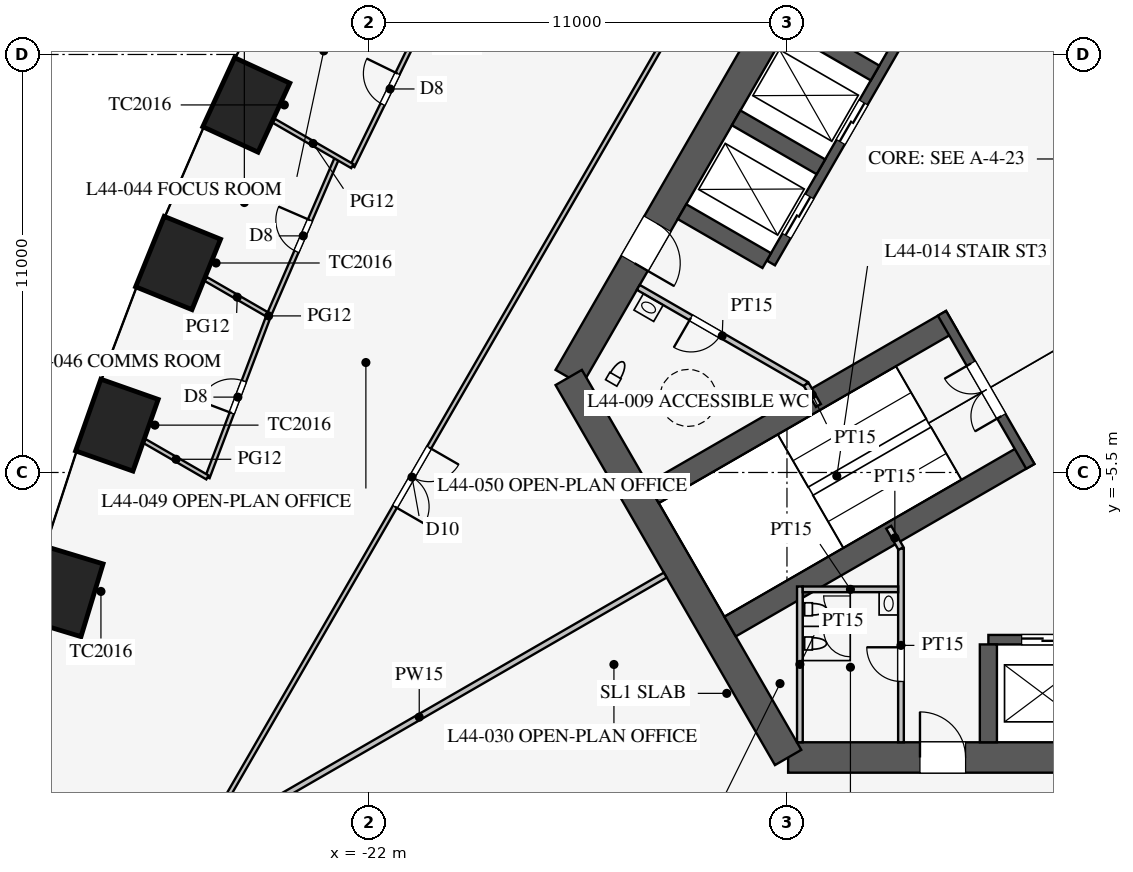
"""IFC4 building model, lengths in metres.
Left out: names, types, materials, properties, quantities, classifications, styles, units other than length and angle.
Written with IfcOpenShell. Run it as: python <this file> out.ifc"""

import sys

from ifc_helpers import new_model, si_unit, direction, frame, frame_2d, origin, origin_2d, place, context, subcontext, project, spatial, rectangle, extrude, element, fill, save


model = new_model("IFC4")
c1 = context("Model", 3, precision=1e-05, world=origin(), true_north=direction((0.0, 1.0)))
c2 = subcontext(c1, "Body", "Model", "MODEL_VIEW")
j1 = project(units=[si_unit("LENGTHUNIT", "METRE"), si_unit("PLANEANGLEUNIT", "RADIAN")], contexts=[c1])
p1 = place(None, origin())
s1 = spatial("IfcSite", under=j1, at=p1, CompositionType="ELEMENT")
p2 = place(p1, origin())
s2 = spatial("IfcBuilding", under=s1, at=p2, CompositionType="ELEMENT")
p3 = place(p2, frame((0.0, 0.0, 193.9)))
s3 = spatial("IfcBuildingStorey", under=s2, at=p3, CompositionType="ELEMENT", Elevation=193.9)
for number, where, z_axis, x_axis in (
    (1, (-25.227, 4.172, 0.0), (0.0, 0.0, 1.0), (-0.418, -0.908, 0.0)),
    (2, (-27.022, 0.013, 0.0), (0.0, 0.0, 1.0), (-0.376, -0.927, 0.0)),
    (3, (-28.632, -4.254, 0.0), (0.0, 0.0, 1.0), (-0.332, -0.943, 0.0)),
    (4, (-30.052, -8.63, 0.0), (0.0, 0.0, 1.0), (-0.29, -0.957, 0.0)),
):
    element("IfcColumn", number, at=place(p3, frame(where, z_axis=z_axis, x_axis=x_axis)), inside=s3, PredefinedType="COLUMN", context=c2, shape_type="SweptSolid", body=[
        extrude(rectangle(XDim=2.0, YDim=1.6, at=origin_2d()), origin(), (0.0, 0.0, 1.0), 4.2),
    ])
p4 = place(p3, frame((-10.97, -13.0, 0.0), z_axis=(0.0, 0.0, 1.0), x_axis=(1.0, 0.0, 0.0)))
e5 = element("IfcWall", 5, at=p4, inside=s3, PredefinedType="SHEAR", context=c2, shape_type="SweptSolid", body=[
    extrude(rectangle(XDim=21.939, YDim=0.8, at=frame_2d((10.97, 0.0))), origin(), (0.0, 0.0, 1.0), 4.2),
])
p5 = place(p4, frame((17.27, 0.0, 0.0)))
e6 = element("IfcOpeningElement", 6, at=p5, cuts=e5, PredefinedType="OPENING", context=c2, shape_type="SweptSolid", body=[
    extrude(rectangle(XDim=1.2, YDim=2.1, at=frame_2d((0.6, 1.05))), frame((0.0, 0.41, 0.0), z_axis=(0.0, -1.0, 0.0), x_axis=(1.0, 0.0, 0.0)), (0.0, 0.0, 1.0), 0.82),
])
p6 = place(p4, frame((3.47, 0.0, 0.0)))
e7 = element("IfcOpeningElement", 7, at=p6, cuts=e5, PredefinedType="OPENING", context=c2, shape_type="SweptSolid", body=[
    extrude(rectangle(XDim=1.2, YDim=2.1, at=frame_2d((0.6, 1.05))), frame((0.0, 0.41, 0.0), z_axis=(0.0, -1.0, 0.0), x_axis=(1.0, 0.0, 0.0)), (0.0, 0.0, 1.0), 0.82),
])
p7 = place(p3, frame((-5.773, 16.0, 0.0), z_axis=(0.0, 0.0, 1.0), x_axis=(-0.500002442456, -0.866023993627, 0.0)))
e8 = element("IfcWall", 8, at=p7, inside=s3, PredefinedType="SHEAR", context=c2, shape_type="SweptSolid", body=[
    extrude(rectangle(XDim=21.939, YDim=0.8, at=frame_2d((10.97, 0.0))), origin(), (0.0, 0.0, 1.0), 4.2),
])
p8 = place(p7, frame((17.27, 0.0, 0.0)))
e9 = element("IfcOpeningElement", 9, at=p8, cuts=e8, PredefinedType="OPENING", context=c2, shape_type="SweptSolid", body=[
    extrude(rectangle(XDim=1.2, YDim=2.1, at=frame_2d((0.6, 1.05))), frame((0.0, 0.41, 0.0), z_axis=(0.0, -1.0, 0.0), x_axis=(1.0, 0.0, 0.0)), (0.0, 0.0, 1.0), 0.82),
])
p9 = place(p7, frame((3.47, 0.0, 0.0)))
e10 = element("IfcOpeningElement", 10, at=p9, cuts=e8, PredefinedType="OPENING", context=c2, shape_type="SweptSolid", body=[
    extrude(rectangle(XDim=1.2, YDim=2.1, at=frame_2d((0.6, 1.05))), frame((0.0, 0.41, 0.0), z_axis=(0.0, -1.0, 0.0), x_axis=(1.0, 0.0, 0.0)), (0.0, 0.0, 1.0), 0.82),
])
p10 = place(p3, frame((-16.743, -3.0, 0.0), z_axis=(0.0, 0.0, 1.0), x_axis=(0.499995765644, -0.866027848477, 0.0)))
e11 = element("IfcWall", 11, at=p10, inside=s3, PredefinedType="SHEAR", context=c2, shape_type="SweptSolid", body=[
    extrude(rectangle(XDim=11.547, YDim=0.8, at=frame_2d((5.773, 0.0))), origin(), (0.0, 0.0, 1.0), 4.2),
])
p11 = place(p3, frame((-5.7, -9.9, 0.0), z_axis=(0.0, 0.0, 1.0), x_axis=(1.0, 0.0, 0.0)))
e12 = element("IfcWall", 12, at=p11, inside=s3, PredefinedType="SHEAR", context=c2, shape_type="SweptSolid", body=[
    extrude(rectangle(XDim=11.4, YDim=0.25, at=frame_2d((5.7, 0.0))), origin(), (0.0, 0.0, 1.0), 4.2),
])
p12 = place(p11, frame((0.875, 0.0, 0.0)))
e13 = element("IfcOpeningElement", 13, at=p12, cuts=e12, PredefinedType="OPENING", context=c2, shape_type="SweptSolid", body=[
    extrude(rectangle(XDim=1.1, YDim=2.2, at=frame_2d((0.55, 1.1))), frame((0.0, 0.135, 0.0), z_axis=(0.0, -1.0, 0.0), x_axis=(1.0, 0.0, 0.0)), (0.0, 0.0, 1.0), 0.27),
])
p13 = place(p11, frame((3.725, 0.0, 0.0)))
e14 = element("IfcOpeningElement", 14, at=p13, cuts=e12, PredefinedType="OPENING", context=c2, shape_type="SweptSolid", body=[
    extrude(rectangle(XDim=1.1, YDim=2.2, at=frame_2d((0.55, 1.1))), frame((0.0, 0.135, 0.0), z_axis=(0.0, -1.0, 0.0), x_axis=(1.0, 0.0, 0.0)), (0.0, 0.0, 1.0), 0.27),
])
p14 = place(p11, frame((6.575, 0.0, 0.0)))
e15 = element("IfcOpeningElement", 15, at=p14, cuts=e12, PredefinedType="OPENING", context=c2, shape_type="SweptSolid", body=[
    extrude(rectangle(XDim=1.1, YDim=2.2, at=frame_2d((0.55, 1.1))), frame((0.0, 0.135, 0.0), z_axis=(0.0, -1.0, 0.0), x_axis=(1.0, 0.0, 0.0)), (0.0, 0.0, 1.0), 0.27),
])
p15 = place(p11, frame((9.425, 0.0, 0.0)))
e16 = element("IfcOpeningElement", 16, at=p15, cuts=e12, PredefinedType="OPENING", context=c2, shape_type="SweptSolid", body=[
    extrude(rectangle(XDim=1.1, YDim=2.2, at=frame_2d((0.55, 1.1))), frame((0.0, 0.135, 0.0), z_axis=(0.0, -1.0, 0.0), x_axis=(1.0, 0.0, 0.0)), (0.0, 0.0, 1.0), 0.27),
])
p16 = place(p3, frame((-5.7, -10.025, 0.0), z_axis=(0.0, 0.0, 1.0), x_axis=(0.0, -1.0, 0.0)))
e17 = element("IfcWall", 17, at=p16, inside=s3, PredefinedType="SHEAR", context=c2, shape_type="SweptSolid", body=[
    extrude(rectangle(XDim=2.575, YDim=0.45, at=frame_2d((1.288, 0.0))), origin(), (0.0, 0.0, 1.0), 4.2),
])
p17 = place(p3, frame((-5.724, 9.886, 0.0), z_axis=(0.0, 0.0, 1.0), x_axis=(-0.500001763848, -0.866024385424, 0.0)))
e18 = element("IfcWall", 18, at=p17, inside=s3, PredefinedType="SHEAR", context=c2, shape_type="SweptSolid", body=[
    extrude(rectangle(XDim=11.4, YDim=0.25, at=frame_2d((5.7, 0.0))), origin(), (0.0, 0.0, 1.0), 4.2),
])
p18 = place(p17, frame((6.525, 0.0, 0.0)))
e19 = element("IfcOpeningElement", 19, at=p18, cuts=e18, PredefinedType="OPENING", context=c2, shape_type="SweptSolid", body=[
    extrude(rectangle(XDim=1.2, YDim=2.2, at=frame_2d((0.6, 1.1))), frame((0.0, 0.135, 0.0), z_axis=(0.0, -1.0, 0.0), x_axis=(1.0, 0.0, 0.0)), (0.0, 0.0, 1.0), 0.27),
])
p19 = place(p17, frame((9.375, 0.0, 0.0)))
e20 = element("IfcOpeningElement", 20, at=p19, cuts=e18, PredefinedType="OPENING", context=c2, shape_type="SweptSolid", body=[
    extrude(rectangle(XDim=1.2, YDim=2.2, at=frame_2d((0.6, 1.1))), frame((0.0, 0.135, 0.0), z_axis=(0.0, -1.0, 0.0), x_axis=(1.0, 0.0, 0.0)), (0.0, 0.0, 1.0), 0.27),
])
for number, where, z_axis, x_axis in (
    (21, (-8.682, 5.012, 0.0), (0.0, 0.0, 1.0), (-0.866, 0.5, 0.0)),
    (22, (-10.107, 2.544, 0.0), (0.0, 0.0, 1.0), (-0.866, 0.5, 0.0)),
    (23, (-11.532, 0.076, 0.0), (0.0, 0.0, 1.0), (-0.866, 0.5, 0.0)),
):
    element("IfcWall", number, at=place(p3, frame(where, z_axis=z_axis, x_axis=x_axis)), inside=s3, PredefinedType="SHEAR", context=c2, shape_type="SweptSolid", body=[
        extrude(rectangle(XDim=2.575, YDim=0.45, at=frame_2d((1.288, 0.0))), origin(), (0.0, 0.0, 1.0), 4.2),
    ])
for number, where, z_axis, x_axis in (
    (24, (-6.663, -1.509, 0.0), (0.0, 0.0, 1.0), (-0.866, -0.5, 0.0)),
    (25, (-4.638, -5.016, 0.0), (0.0, 0.0, 1.0), (-0.866, -0.5, 0.0)),
):
    element("IfcWall", number, at=place(p3, frame(where, z_axis=z_axis, x_axis=x_axis)), inside=s3, PredefinedType="SHEAR", context=c2, shape_type="SweptSolid", body=[
        extrude(rectangle(XDim=9.075, YDim=0.6, at=frame_2d((4.538, 0.0))), origin(), (0.0, 0.0, 1.0), 4.2),
    ])
p20 = place(p3, frame((-6.922, -1.312, 0.0), z_axis=(0.0, 0.0, 1.0), x_axis=(0.499984536904, -0.866034331223, 0.0)))
e26 = element("IfcWall", 26, at=p20, inside=s3, PredefinedType="SHEAR", context=c2, shape_type="SweptSolid", body=[
    extrude(rectangle(XDim=4.65, YDim=0.25, at=frame_2d((2.325, 0.0))), origin(), (0.0, 0.0, 1.0), 4.2),
])
p21 = place(p20, frame((1.525, 0.0, 0.0)))
e27 = element("IfcOpeningElement", 27, at=p21, cuts=e26, PredefinedType="OPENING", context=c2, shape_type="SweptSolid", body=[
    extrude(rectangle(XDim=1.6, YDim=2.1, at=frame_2d((0.8, 1.05))), frame((0.0, 0.135, 0.0), z_axis=(0.0, -1.0, 0.0), x_axis=(1.0, 0.0, 0.0)), (0.0, 0.0, 1.0), 0.27),
])
p22 = place(p3, frame((-8.0, -7.5, 0.0), z_axis=(0.0, 0.0, 1.0), x_axis=(0.0, -1.0, 0.0)))
e28 = element("IfcWall", 28, at=p22, inside=s3, PredefinedType="PARTITIONING", context=c2, shape_type="SweptSolid", body=[
    extrude(rectangle(XDim=5.1, YDim=0.15, at=frame_2d((2.55, 0.0))), origin(), (0.0, 0.0, 1.0), 4.0),
])
p23 = place(p22, frame((2.6, 0.0, 0.0)))
e29 = element("IfcOpeningElement", 29, at=p23, cuts=e28, PredefinedType="OPENING", context=c2, shape_type="SweptSolid", body=[
    extrude(rectangle(XDim=0.9, YDim=2.1, at=frame_2d((0.45, 1.05))), frame((0.0, 0.085, 0.0), z_axis=(0.0, -1.0, 0.0), x_axis=(1.0, 0.0, 0.0)), (0.0, 0.0, 1.0), 0.17),
])
p24 = place(p3, frame((-10.495, -3.178, 0.0), z_axis=(0.0, 0.0, 1.0), x_axis=(-0.86602216432, 0.500005610874, 0.0)))
e30 = element("IfcWall", 30, at=p24, inside=s3, PredefinedType="PARTITIONING", context=c2, shape_type="SweptSolid", body=[
    extrude(rectangle(XDim=5.1, YDim=0.15, at=frame_2d((2.55, 0.0))), origin(), (0.0, 0.0, 1.0), 4.0),
])
p25 = place(p24, frame((2.6, 0.0, 0.0)))
e31 = element("IfcOpeningElement", 31, at=p25, cuts=e30, PredefinedType="OPENING", context=c2, shape_type="SweptSolid", body=[
    extrude(rectangle(XDim=0.9, YDim=2.1, at=frame_2d((0.45, 1.05))), frame((0.0, 0.085, 0.0), z_axis=(0.0, -1.0, 0.0), x_axis=(1.0, 0.0, 0.0)), (0.0, 0.0, 1.0), 0.17),
])
for number, where, z_axis, x_axis in (
    (32, (-10.495, -3.178, 0.0), (0.0, 0.0, 1.0), (0.5, -0.866, 0.0)),
    (33, (-8.0, -7.5, 0.0), (0.0, 0.0, 1.0), (-0.5, 0.866, 0.0)),
):
    element("IfcWall", number, at=place(p3, frame(where, z_axis=z_axis, x_axis=x_axis)), inside=s3, PredefinedType="PARTITIONING", context=c2, shape_type="SweptSolid", body=[
        extrude(rectangle(XDim=0.645, YDim=0.15, at=frame_2d((0.323, 0.0))), origin(), (0.0, 0.0, 1.0), 4.0),
    ])
p26 = place(p3, frame((-10.66, -8.5, 0.0), z_axis=(0.0, 0.0, 1.0), x_axis=(0.0, -1.0, 0.0)))
e34 = element("IfcWall", 34, at=p26, inside=s3, PredefinedType="PARTITIONING", context=c2, shape_type="SweptSolid", body=[
    extrude(rectangle(XDim=4.1, YDim=0.15, at=frame_2d((2.05, 0.0))), origin(), (0.0, 0.0, 1.0), 4.0),
])
p27 = place(p3, frame((-8.075, -8.575, 0.0), z_axis=(0.0, 0.0, 1.0), x_axis=(-1.0, 0.0, 0.0)))
e35 = element("IfcWall", 35, at=p27, inside=s3, PredefinedType="PARTITIONING", context=c2, shape_type="SweptSolid", body=[
    extrude(rectangle(XDim=2.51, YDim=0.15, at=frame_2d((1.255, 0.0))), origin(), (0.0, 0.0, 1.0), 4.0),
])
p28 = place(p3, frame((-14.203, -8.2, 0.0), z_axis=(0.0, 0.0, 1.0), x_axis=(-0.866021600284, -0.500006587798, 0.0)))
e36 = element("IfcWall", 36, at=p28, inside=s3, PredefinedType="PARTITIONING", context=c2, shape_type="SweptSolid", body=[
    extrude(rectangle(XDim=14.95, YDim=0.15, at=frame_2d((7.475, 0.0))), origin(), (0.0, 0.0, 1.0), 2.4),
])
p29 = place(p3, frame((-0.016, 30.491, 0.0), z_axis=(0.0, 0.0, 1.0), x_axis=(-0.50000091641, -0.866024874695, 0.0)))
e37 = element("IfcWall", 37, at=p29, inside=s3, PredefinedType="PARTITIONING", context=c2, shape_type="SweptSolid", body=[
    extrude(rectangle(XDim=52.796, YDim=0.12, at=frame_2d((26.398, 0.0))), origin(), (0.0, 0.0, 1.0), 2.9),
])
p30 = place(p29, frame((10.2, 0.0, 0.15)))
e38 = element("IfcOpeningElement", 38, at=p30, cuts=e37, PredefinedType="OPENING", context=c2, shape_type="SweptSolid", body=[
    extrude(rectangle(XDim=1.8, YDim=2.1, at=frame_2d((0.9, 1.05))), frame((0.0, 0.07, 0.0), z_axis=(0.0, -1.0, 0.0), x_axis=(1.0, 0.0, 0.0)), (0.0, 0.0, 1.0), 0.14),
])
p31 = place(p29, frame((40.8, 0.0, 0.15)))
e39 = element("IfcOpeningElement", 39, at=p31, cuts=e37, PredefinedType="OPENING", context=c2, shape_type="SweptSolid", body=[
    extrude(rectangle(XDim=1.8, YDim=2.1, at=frame_2d((0.9, 1.05))), frame((0.0, 0.07, 0.0), z_axis=(0.0, -1.0, 0.0), x_axis=(1.0, 0.0, 0.0)), (0.0, 0.0, 1.0), 0.14),
])
p32 = place(p3, frame((-24.634, -1.366, 0.0), z_axis=(0.0, 0.0, 1.0), x_axis=(-0.3542667952, -0.935144394101, 0.0)))
e40 = element("IfcWall", 40, at=p32, inside=s3, PredefinedType="PARTITIONING", context=c2, shape_type="SweptSolid", body=[
    extrude(rectangle(XDim=4.559, YDim=0.12, at=frame_2d((2.28, 0.0))), origin(), (0.0, 0.0, 1.0), 2.9),
])
p33 = place(p32, frame((1.85, 0.0, 0.15)))
e41 = element("IfcOpeningElement", 41, at=p33, cuts=e40, PredefinedType="OPENING", context=c2, shape_type="SweptSolid", body=[
    extrude(rectangle(XDim=0.9, YDim=2.1, at=frame_2d((0.45, 1.05))), frame((0.0, 0.07, 0.0), z_axis=(0.0, -1.0, 0.0), x_axis=(1.0, 0.0, 0.0)), (0.0, 0.0, 1.0), 0.14),
])
p34 = place(p3, frame((-20.456, 6.614, 0.0), z_axis=(0.0, 0.0, 1.0), x_axis=(-0.43911984878, -0.898428493764, 0.0)))
e42 = element("IfcWall", 42, at=p34, inside=s3, PredefinedType="PARTITIONING", context=c2, shape_type="SweptSolid", body=[
    extrude(rectangle(XDim=4.511, YDim=0.12, at=frame_2d((2.255, 0.0))), origin(), (0.0, 0.0, 1.0), 2.9),
])
p35 = place(p34, frame((1.8, 0.0, 0.15)))
e43 = element("IfcOpeningElement", 43, at=p35, cuts=e42, PredefinedType="OPENING", context=c2, shape_type="SweptSolid", body=[
    extrude(rectangle(XDim=0.9, YDim=2.1, at=frame_2d((0.45, 1.05))), frame((0.0, 0.07, 0.0), z_axis=(0.0, -1.0, 0.0), x_axis=(1.0, 0.0, 0.0)), (0.0, 0.0, 1.0), 0.14),
])
p36 = place(p3, frame((-22.835, 2.792, 0.0), z_axis=(0.0, 0.0, 1.0), x_axis=(-0.397208101111, -0.917728567939, 0.0)))
e44 = element("IfcWall", 44, at=p36, inside=s3, PredefinedType="PARTITIONING", context=c2, shape_type="SweptSolid", body=[
    extrude(rectangle(XDim=4.53, YDim=0.12, at=frame_2d((2.265, 0.0))), origin(), (0.0, 0.0, 1.0), 2.9),
])
p37 = place(p36, frame((1.8, 0.0, 0.15)))
e45 = element("IfcOpeningElement", 45, at=p37, cuts=e44, PredefinedType="OPENING", context=c2, shape_type="SweptSolid", body=[
    extrude(rectangle(XDim=0.9, YDim=2.1, at=frame_2d((0.45, 1.05))), frame((0.0, 0.07, 0.0), z_axis=(0.0, -1.0, 0.0), x_axis=(1.0, 0.0, 0.0)), (0.0, 0.0, 1.0), 0.14),
])
p38 = place(p3, frame((-24.634, -1.366, 0.0), z_axis=(0.0, 0.0, 1.0), x_axis=(-0.86603520599, 0.499983021698, 0.0)))
e46 = element("IfcWall", 46, at=p38, inside=s3, PredefinedType="PARTITIONING", context=c2, shape_type="SweptSolid", body=[
    extrude(rectangle(XDim=1.919, YDim=0.12, at=frame_2d((0.96, 0.0))), origin(), (0.0, 0.0, 1.0), 2.8),
])
p39 = place(p3, frame((-26.25, -5.629, 0.0), z_axis=(0.0, 0.0, 1.0), x_axis=(-0.866036337748, 0.499981061341, 0.0)))
e47 = element("IfcWall", 47, at=p39, inside=s3, PredefinedType="PARTITIONING", context=c2, shape_type="SweptSolid", body=[
    extrude(rectangle(XDim=1.907, YDim=0.12, at=frame_2d((0.953, 0.0))), origin(), (0.0, 0.0, 1.0), 2.8),
])
p40 = place(p3, frame((-22.437, 2.562, 0.0), z_axis=(0.0, 0.0, 1.0), x_axis=(-0.866013634004, 0.500020385304, 0.0)))
e48 = element("IfcWall", 48, at=p40, inside=s3, PredefinedType="PARTITIONING", context=c2, shape_type="SweptSolid", body=[
    extrude(rectangle(XDim=2.388, YDim=0.12, at=frame_2d((1.194, 0.0))), origin(), (0.0, 0.0, 1.0), 2.9),
])
p41 = place(p23, frame((0.9, 0.0, 0.0), z_axis=(0.0, 0.0, 1.0), x_axis=(-1.0, 0.0, 0.0)))
e49 = element("IfcDoor", 49, at=p41, inside=s3, OperationType="SINGLE_SWING_RIGHT", PredefinedType="DOOR", context=c2, shape_type="SweptSolid", body=[
    extrude(rectangle(XDim=0.9, YDim=2.1, at=frame_2d((0.45, 1.05))), frame((0.0, 0.025, 0.0), z_axis=(0.0, -1.0, 0.0), x_axis=(1.0, 0.0, 0.0)), (0.0, 0.0, 1.0), 0.05),
])
fill(e29, e49)
p42 = place(p25, origin())
e50 = element("IfcDoor", 50, at=p42, inside=s3, OperationType="SINGLE_SWING_RIGHT", PredefinedType="DOOR", context=c2, shape_type="SweptSolid", body=[
    extrude(rectangle(XDim=0.9, YDim=2.1, at=frame_2d((0.45, 1.05))), frame((0.0, 0.025, 0.0), z_axis=(0.0, -1.0, 0.0), x_axis=(1.0, 0.0, 0.0)), (0.0, 0.0, 1.0), 0.05),
])
fill(e31, e50)
p43 = place(p21, frame((1.6, 0.0, 0.0), z_axis=(0.0, 0.0, 1.0), x_axis=(-1.0, 0.0, 0.0)))
e51 = element("IfcDoor", 51, at=p43, inside=s3, OperationType="DOUBLE_DOOR_SINGLE_SWING", PredefinedType="DOOR", context=c2, shape_type="SweptSolid", body=[
    extrude(rectangle(XDim=1.6, YDim=2.1, at=frame_2d((0.8, 1.05))), frame((0.0, 0.025, 0.0), z_axis=(0.0, -1.0, 0.0), x_axis=(1.0, 0.0, 0.0)), (0.0, 0.0, 1.0), 0.05),
])
fill(e27, e51)
p44 = place(p6, origin())
e52 = element("IfcDoor", 52, at=p44, inside=s3, OperationType="SINGLE_SWING_LEFT", PredefinedType="DOOR", context=c2, shape_type="SweptSolid", body=[
    extrude(rectangle(XDim=1.2, YDim=2.1, at=frame_2d((0.6, 1.05))), frame((0.0, 0.025, 0.0), z_axis=(0.0, -1.0, 0.0), x_axis=(1.0, 0.0, 0.0)), (0.0, 0.0, 1.0), 0.05),
])
fill(e7, e52)
p45 = place(p8, origin())
e53 = element("IfcDoor", 53, at=p45, inside=s3, OperationType="SINGLE_SWING_RIGHT", PredefinedType="DOOR", context=c2, shape_type="SweptSolid", body=[
    extrude(rectangle(XDim=1.2, YDim=2.1, at=frame_2d((0.6, 1.05))), frame((0.0, 0.025, 0.0), z_axis=(0.0, -1.0, 0.0), x_axis=(1.0, 0.0, 0.0)), (0.0, 0.0, 1.0), 0.05),
])
fill(e9, e53)
p46 = place(p35, frame((0.9, 0.0, 0.0), z_axis=(0.0, 0.0, 1.0), x_axis=(-1.0, 0.0, 0.0)))
e54 = element("IfcDoor", 54, at=p46, inside=s3, OperationType="SINGLE_SWING_RIGHT", PredefinedType="DOOR", context=c2, shape_type="SweptSolid", body=[
    extrude(rectangle(XDim=0.9, YDim=2.1, at=frame_2d((0.45, 1.05))), frame((0.0, 0.025, 0.0), z_axis=(0.0, -1.0, 0.0), x_axis=(1.0, 0.0, 0.0)), (0.0, 0.0, 1.0), 0.05),
])
fill(e43, e54)
p47 = place(p37, frame((0.9, 0.0, 0.0), z_axis=(0.0, 0.0, 1.0), x_axis=(-1.0, 0.0, 0.0)))
e55 = element("IfcDoor", 55, at=p47, inside=s3, OperationType="SINGLE_SWING_RIGHT", PredefinedType="DOOR", context=c2, shape_type="SweptSolid", body=[
    extrude(rectangle(XDim=0.9, YDim=2.1, at=frame_2d((0.45, 1.05))), frame((0.0, 0.025, 0.0), z_axis=(0.0, -1.0, 0.0), x_axis=(1.0, 0.0, 0.0)), (0.0, 0.0, 1.0), 0.05),
])
fill(e45, e55)
p48 = place(p33, frame((0.9, 0.0, 0.0), z_axis=(0.0, 0.0, 1.0), x_axis=(-1.0, 0.0, 0.0)))
e56 = element("IfcDoor", 56, at=p48, inside=s3, OperationType="SINGLE_SWING_LEFT", PredefinedType="DOOR", context=c2, shape_type="SweptSolid", body=[
    extrude(rectangle(XDim=0.9, YDim=2.1, at=frame_2d((0.45, 1.05))), frame((0.0, 0.025, 0.0), z_axis=(0.0, -1.0, 0.0), x_axis=(1.0, 0.0, 0.0)), (0.0, 0.0, 1.0), 0.05),
])
fill(e41, e56)
p49 = place(p31, origin())
e57 = element("IfcDoor", 57, at=p49, inside=s3, OperationType="DOUBLE_DOOR_SINGLE_SWING", PredefinedType="DOOR", context=c2, shape_type="SweptSolid", body=[
    extrude(rectangle(XDim=1.8, YDim=2.1, at=frame_2d((0.9, 1.05))), frame((0.0, 0.025, 0.0), z_axis=(0.0, -1.0, 0.0), x_axis=(1.0, 0.0, 0.0)), (0.0, 0.0, 1.0), 0.05),
])
fill(e39, e57)
p50 = place(p12, origin())
e58 = element("IfcDoor", 58, at=p50, inside=s3, OperationType="DOUBLE_DOOR_SLIDING", PredefinedType="DOOR", context=c2, shape_type="SweptSolid", body=[
    extrude(rectangle(XDim=1.1, YDim=2.2, at=frame_2d((0.55, 1.1))), frame((0.0, 0.025, 0.0), z_axis=(0.0, -1.0, 0.0), x_axis=(1.0, 0.0, 0.0)), (0.0, 0.0, 1.0), 0.05),
])
fill(e13, e58)
p51 = place(p18, origin())
e59 = element("IfcDoor", 59, at=p51, inside=s3, OperationType="DOUBLE_DOOR_SLIDING", PredefinedType="DOOR", context=c2, shape_type="SweptSolid", body=[
    extrude(rectangle(XDim=1.2, YDim=2.2, at=frame_2d((0.6, 1.1))), frame((0.0, 0.025, 0.0), z_axis=(0.0, -1.0, 0.0), x_axis=(1.0, 0.0, 0.0)), (0.0, 0.0, 1.0), 0.05),
])
fill(e19, e59)
p52 = place(p19, origin())
e60 = element("IfcDoor", 60, at=p52, inside=s3, OperationType="DOUBLE_DOOR_SLIDING", PredefinedType="DOOR", context=c2, shape_type="SweptSolid", body=[
    extrude(rectangle(XDim=1.2, YDim=2.2, at=frame_2d((0.6, 1.1))), frame((0.0, 0.025, 0.0), z_axis=(0.0, -1.0, 0.0), x_axis=(1.0, 0.0, 0.0)), (0.0, 0.0, 1.0), 0.05),
])
fill(e20, e60)
save(model, sys.argv[1])
